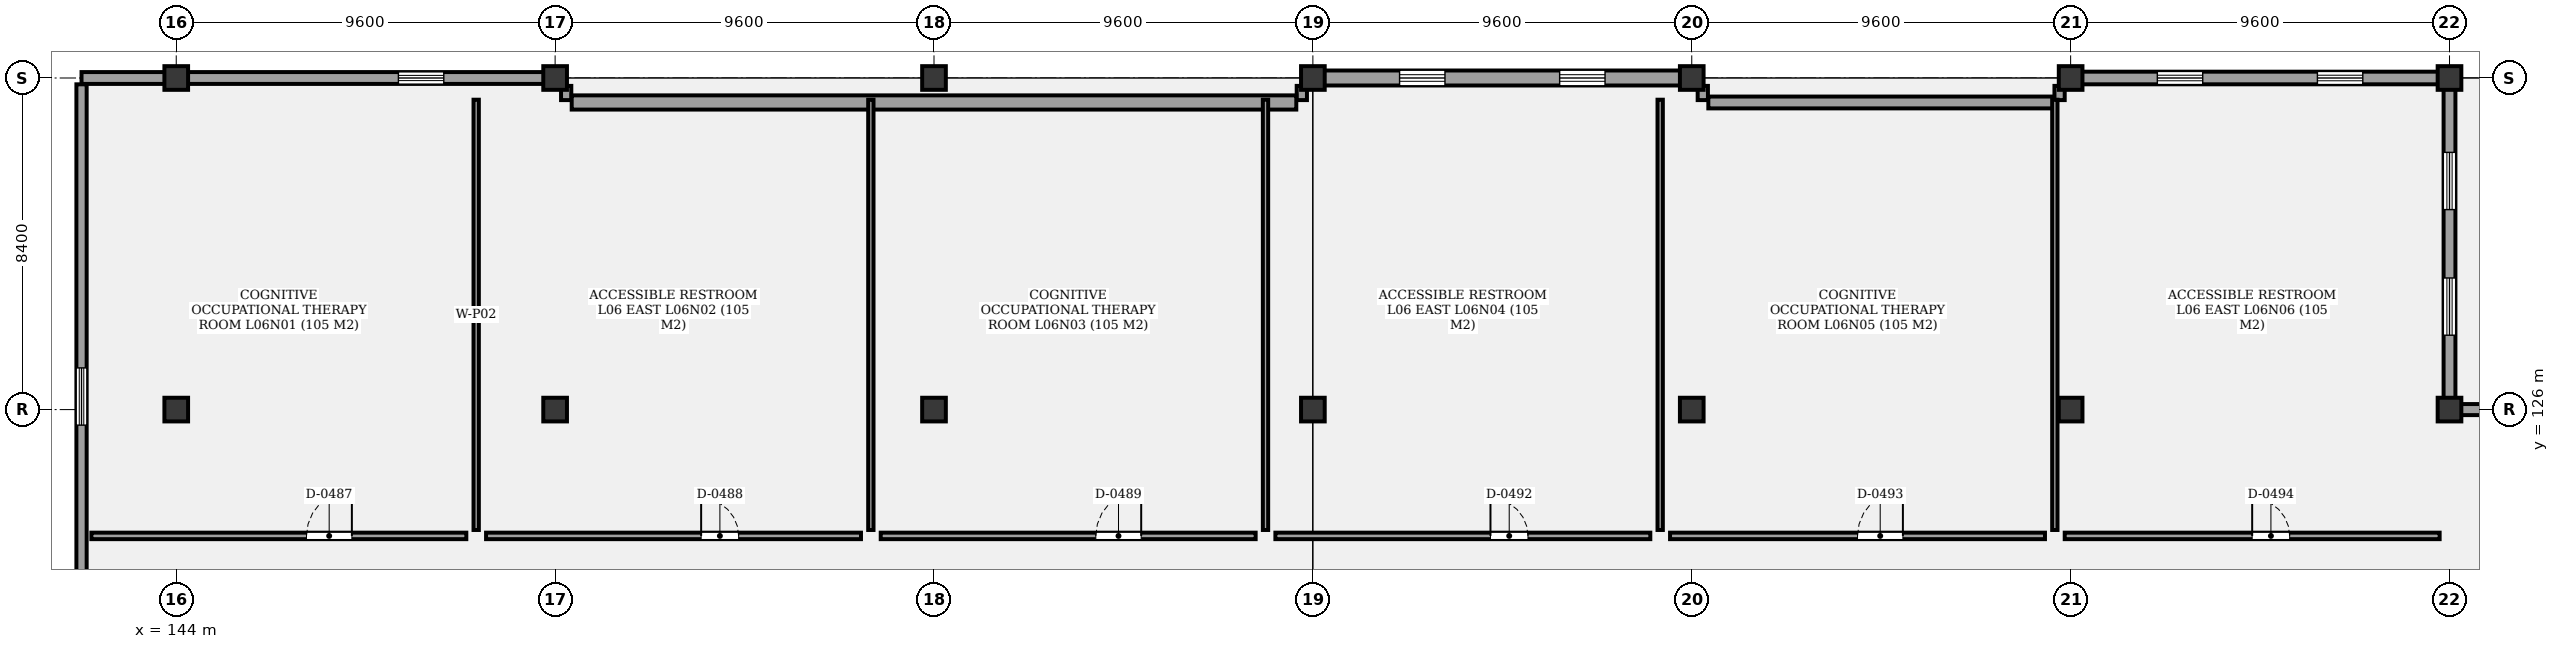
"""IFC4 building model, lengths in metres.
Left out: names, types, materials, properties, quantities, classifications, styles, units other than length and angle.
Written with IfcOpenShell. Run it as: python <this file> out.ifc"""

import sys

from ifc_helpers import new_model, si_unit, direction, frame, frame_2d, origin, origin_2d, place, context, subcontext, project, spatial, rectangle, extrude, element, fill, save


model = new_model("IFC4")
c1 = context("Model", 3, precision=1e-05, world=origin(), true_north=direction((0.0, 1.0)))
c2 = subcontext(c1, "Body", "Model", "MODEL_VIEW")
j1 = project(units=[si_unit("LENGTHUNIT", "METRE"), si_unit("PLANEANGLEUNIT", "RADIAN")], contexts=[c1])
p1 = place(None, origin())
s1 = spatial("IfcSite", under=j1, at=p1, CompositionType="ELEMENT")
p2 = place(p1, origin())
s2 = spatial("IfcBuilding", under=s1, at=p2, CompositionType="ELEMENT")
p3 = place(p2, frame((0.0, 0.0, 26.2)))
s3 = spatial("IfcBuildingStorey", under=s2, at=p3, CompositionType="ELEMENT", Elevation=26.2)
for number, where, z_axis, x_axis in (
    (1, (144.0, 126.0, 0.0), (0.0, 0.0, 1.0), (1.0, 0.0, 0.0)),
    (2, (144.0, 134.4, 0.0), (0.0, 0.0, 1.0), (1.0, 0.0, 0.0)),
    (3, (153.6, 126.0, 0.0), (0.0, 0.0, 1.0), (1.0, 0.0, 0.0)),
    (4, (153.6, 134.4, 0.0), (0.0, 0.0, 1.0), (1.0, 0.0, 0.0)),
    (5, (163.2, 126.0, 0.0), (0.0, 0.0, 1.0), (1.0, 0.0, 0.0)),
    (6, (163.2, 134.4, 0.0), (0.0, 0.0, 1.0), (1.0, 0.0, 0.0)),
    (7, (172.8, 126.0, 0.0), (0.0, 0.0, 1.0), (1.0, 0.0, 0.0)),
    (8, (172.8, 134.4, 0.0), (0.0, 0.0, 1.0), (1.0, 0.0, 0.0)),
    (9, (182.4, 126.0, 0.0), (0.0, 0.0, 1.0), (1.0, 0.0, 0.0)),
    (10, (182.4, 134.4, 0.0), (0.0, 0.0, 1.0), (1.0, 0.0, 0.0)),
    (11, (192.0, 126.0, 0.0), (0.0, 0.0, 1.0), (1.0, 0.0, 0.0)),
    (12, (192.0, 134.4, 0.0), (0.0, 0.0, 1.0), (1.0, 0.0, 0.0)),
    (13, (201.6, 126.0, 0.0), (0.0, 0.0, 1.0), (1.0, 0.0, 0.0)),
    (14, (201.6, 134.4, 0.0), (0.0, 0.0, 1.0), (1.0, 0.0, 0.0)),
):
    element("IfcColumn", number, at=place(p3, frame(where, z_axis=z_axis, x_axis=x_axis)), inside=s3, PredefinedType="COLUMN", context=c2, shape_type="SweptSolid", body=[
        extrude(rectangle(XDim=0.6, YDim=0.6, at=origin_2d()), origin(), (0.0, 0.0, 1.0), 4.2),
    ])
p4 = place(p3, frame((201.6, 126.0, 0.0), z_axis=(0.0, 0.0, 1.0), x_axis=(1.0, 0.0, 0.0)))
e15 = element("IfcWall", 15, at=p4, inside=s3, PredefinedType="SOLIDWALL", context=c2, shape_type="SweptSolid", body=[
    extrude(rectangle(XDim=9.6, YDim=0.28, at=frame_2d((4.8, 0.0))), origin(), (0.0, 0.0, 1.0), 3.39),
])
p5 = place(p4, frame((2.158, 0.0, 0.85)))
e16 = element("IfcOpeningElement", 16, at=p5, cuts=e15, PredefinedType="OPENING", context=c2, shape_type="SweptSolid", body=[
    extrude(rectangle(XDim=1.3, YDim=1.6, at=frame_2d((0.65, 0.8))), frame((0.0, 0.15, 0.0), z_axis=(0.0, -1.0, 0.0), x_axis=(1.0, 0.0, 0.0)), (0.0, 0.0, 1.0), 0.3),
])
p6 = place(p4, frame((6.142, 0.0, 0.85)))
e17 = element("IfcOpeningElement", 17, at=p6, cuts=e15, PredefinedType="OPENING", context=c2, shape_type="SweptSolid", body=[
    extrude(rectangle(XDim=1.3, YDim=1.6, at=frame_2d((0.65, 0.8))), frame((0.0, 0.15, 0.0), z_axis=(0.0, -1.0, 0.0), x_axis=(1.0, 0.0, 0.0)), (0.0, 0.0, 1.0), 0.3),
])
p7 = place(p3, frame((141.6, 134.4, 0.0), z_axis=(0.0, 0.0, 1.0), x_axis=(1.0, 0.0, 0.0)))
e18 = element("IfcWall", 18, at=p7, inside=s3, PredefinedType="SOLIDWALL", context=c2, shape_type="SweptSolid", body=[
    extrude(rectangle(XDim=12.0, YDim=0.3, at=frame_2d((6.0, 0.0))), origin(), (0.0, 0.0, 1.0), 3.39),
])
p8 = place(p7, frame((8.029, 0.0, 0.85)))
e19 = element("IfcOpeningElement", 19, at=p8, cuts=e18, PredefinedType="OPENING", context=c2, shape_type="SweptSolid", body=[
    extrude(rectangle(XDim=1.15, YDim=1.6, at=frame_2d((0.575, 0.8))), frame((0.0, 0.16, 0.0), z_axis=(0.0, -1.0, 0.0), x_axis=(1.0, 0.0, 0.0)), (0.0, 0.0, 1.0), 0.32),
])
for number, where, z_axis, x_axis in (
    (20, (153.88, 134.2, 0.0), (0.0, 0.0, 1.0), (0.0, -1.0, 0.0)),
    (21, (172.52, 134.2, 0.0), (0.0, 0.0, 1.0), (0.0, -1.0, 0.0)),
):
    element("IfcWall", number, at=place(p3, frame(where, z_axis=z_axis, x_axis=x_axis)), inside=s3, PredefinedType="SOLIDWALL", context=c2, shape_type="SweptSolid", body=[
        extrude(rectangle(XDim=0.36, YDim=0.26, at=frame_2d((0.18, 0.0))), origin(), (0.0, 0.0, 1.0), 3.39),
    ])
p9 = place(p3, frame((154.02, 133.78, 0.0), z_axis=(0.0, 0.0, 1.0), x_axis=(1.0, 0.0, 0.0)))
e22 = element("IfcWall", 22, at=p9, inside=s3, PredefinedType="SOLIDWALL", context=c2, shape_type="SweptSolid", body=[
    extrude(rectangle(XDim=18.36, YDim=0.36, at=frame_2d((9.18, 0.0))), origin(), (0.0, 0.0, 1.0), 3.39),
])
p10 = place(p3, frame((172.8, 134.4, 0.0), z_axis=(0.0, 0.0, 1.0), x_axis=(1.0, 0.0, 0.0)))
e23 = element("IfcWall", 23, at=p10, inside=s3, PredefinedType="SOLIDWALL", context=c2, shape_type="SweptSolid", body=[
    extrude(rectangle(XDim=9.6, YDim=0.38, at=frame_2d((4.8, 0.0))), origin(), (0.0, 0.0, 1.0), 3.39),
])
p11 = place(p10, frame((2.197, 0.0, 0.85)))
e24 = element("IfcOpeningElement", 24, at=p11, cuts=e23, PredefinedType="OPENING", context=c2, shape_type="SweptSolid", body=[
    extrude(rectangle(XDim=1.15, YDim=1.6, at=frame_2d((0.575, 0.8))), frame((0.0, 0.2, 0.0), z_axis=(0.0, -1.0, 0.0), x_axis=(1.0, 0.0, 0.0)), (0.0, 0.0, 1.0), 0.4),
])
p12 = place(p10, frame((6.253, 0.0, 0.85)))
e25 = element("IfcOpeningElement", 25, at=p12, cuts=e23, PredefinedType="OPENING", context=c2, shape_type="SweptSolid", body=[
    extrude(rectangle(XDim=1.15, YDim=1.6, at=frame_2d((0.575, 0.8))), frame((0.0, 0.2, 0.0), z_axis=(0.0, -1.0, 0.0), x_axis=(1.0, 0.0, 0.0)), (0.0, 0.0, 1.0), 0.4),
])
for number, where, z_axis, x_axis in (
    (26, (182.68, 134.2, 0.0), (0.0, 0.0, 1.0), (0.0, -1.0, 0.0)),
    (27, (191.72, 134.2, 0.0), (0.0, 0.0, 1.0), (0.0, -1.0, 0.0)),
):
    element("IfcWall", number, at=place(p3, frame(where, z_axis=z_axis, x_axis=x_axis)), inside=s3, PredefinedType="SOLIDWALL", context=c2, shape_type="SweptSolid", body=[
        extrude(rectangle(XDim=0.36, YDim=0.26, at=frame_2d((0.18, 0.0))), origin(), (0.0, 0.0, 1.0), 3.39),
    ])
p13 = place(p3, frame((182.82, 133.78, 0.0), z_axis=(0.0, 0.0, 1.0), x_axis=(1.0, 0.0, 0.0)))
e28 = element("IfcWall", 28, at=p13, inside=s3, PredefinedType="SOLIDWALL", context=c2, shape_type="SweptSolid", body=[
    extrude(rectangle(XDim=8.76, YDim=0.3, at=frame_2d((4.38, 0.0))), origin(), (0.0, 0.0, 1.0), 3.39),
])
p14 = place(p3, frame((192.0, 134.4, 0.0), z_axis=(0.0, 0.0, 1.0), x_axis=(1.0, 0.0, 0.0)))
e29 = element("IfcWall", 29, at=p14, inside=s3, PredefinedType="SOLIDWALL", context=c2, shape_type="SweptSolid", body=[
    extrude(rectangle(XDim=9.6, YDim=0.32, at=frame_2d((4.8, 0.0))), origin(), (0.0, 0.0, 1.0), 3.39),
])
p15 = place(p14, frame((2.197, 0.0, 0.85)))
e30 = element("IfcOpeningElement", 30, at=p15, cuts=e29, PredefinedType="OPENING", context=c2, shape_type="SweptSolid", body=[
    extrude(rectangle(XDim=1.15, YDim=1.6, at=frame_2d((0.575, 0.8))), frame((0.0, 0.17, 0.0), z_axis=(0.0, -1.0, 0.0), x_axis=(1.0, 0.0, 0.0)), (0.0, 0.0, 1.0), 0.34),
])
p16 = place(p14, frame((6.253, 0.0, 0.85)))
e31 = element("IfcOpeningElement", 31, at=p16, cuts=e29, PredefinedType="OPENING", context=c2, shape_type="SweptSolid", body=[
    extrude(rectangle(XDim=1.15, YDim=1.6, at=frame_2d((0.575, 0.8))), frame((0.0, 0.17, 0.0), z_axis=(0.0, -1.0, 0.0), x_axis=(1.0, 0.0, 0.0)), (0.0, 0.0, 1.0), 0.34),
])
p17 = place(p3, frame((141.6, 105.16, 0.0), z_axis=(0.0, 0.0, 1.0), x_axis=(0.0, 1.0, 0.0)))
e32 = element("IfcWall", 32, at=p17, inside=s3, PredefinedType="SOLIDWALL", context=c2, shape_type="SweptSolid", body=[
    extrude(rectangle(XDim=29.08, YDim=0.26, at=frame_2d((14.54, 0.0))), origin(), (0.0, 0.0, 1.0), 3.39),
])
p18 = place(p17, frame((7.184, 0.0, 0.85)))
e33 = element("IfcOpeningElement", 33, at=p18, cuts=e32, PredefinedType="OPENING", context=c2, shape_type="SweptSolid", body=[
    extrude(rectangle(XDim=1.45, YDim=1.6, at=frame_2d((0.725, 0.8))), frame((0.0, 0.14, 0.0), z_axis=(0.0, -1.0, 0.0), x_axis=(1.0, 0.0, 0.0)), (0.0, 0.0, 1.0), 0.28),
])
p19 = place(p17, frame((20.446, 0.0, 0.85)))
e34 = element("IfcOpeningElement", 34, at=p19, cuts=e32, PredefinedType="OPENING", context=c2, shape_type="SweptSolid", body=[
    extrude(rectangle(XDim=1.45, YDim=1.6, at=frame_2d((0.725, 0.8))), frame((0.0, 0.14, 0.0), z_axis=(0.0, -1.0, 0.0), x_axis=(1.0, 0.0, 0.0)), (0.0, 0.0, 1.0), 0.28),
])
p20 = place(p3, frame((201.6, 134.24, 0.0), z_axis=(0.0, 0.0, 1.0), x_axis=(0.0, -1.0, 0.0)))
e35 = element("IfcWall", 35, at=p20, inside=s3, PredefinedType="SOLIDWALL", context=c2, shape_type="SweptSolid", body=[
    extrude(rectangle(XDim=8.08, YDim=0.3, at=frame_2d((4.04, 0.0))), origin(), (0.0, 0.0, 1.0), 3.39),
])
p21 = place(p20, frame((1.724, 0.0, 0.85)))
e36 = element("IfcOpeningElement", 36, at=p21, cuts=e35, PredefinedType="OPENING", context=c2, shape_type="SweptSolid", body=[
    extrude(rectangle(XDim=1.45, YDim=1.6, at=frame_2d((0.725, 0.8))), frame((0.0, 0.16, 0.0), z_axis=(0.0, -1.0, 0.0), x_axis=(1.0, 0.0, 0.0)), (0.0, 0.0, 1.0), 0.32),
])
p22 = place(p20, frame((4.906, 0.0, 0.85)))
e37 = element("IfcOpeningElement", 37, at=p22, cuts=e35, PredefinedType="OPENING", context=c2, shape_type="SweptSolid", body=[
    extrude(rectangle(XDim=1.45, YDim=1.6, at=frame_2d((0.725, 0.8))), frame((0.0, 0.16, 0.0), z_axis=(0.0, -1.0, 0.0), x_axis=(1.0, 0.0, 0.0)), (0.0, 0.0, 1.0), 0.32),
])
p23 = place(p3, frame((141.85, 122.8, 0.0), z_axis=(0.0, 0.0, 1.0), x_axis=(1.0, 0.0, 0.0)))
e38 = element("IfcWall", 38, at=p23, inside=s3, PredefinedType="PARTITIONING", context=c2, shape_type="SweptSolid", body=[
    extrude(rectangle(XDim=9.5, YDim=0.165, at=frame_2d((4.75, 0.0))), origin(), (0.0, 0.0, 1.0), 3.3),
])
p24 = place(p23, frame((5.45, 0.0, 0.0)))
e39 = element("IfcOpeningElement", 39, at=p24, cuts=e38, PredefinedType="OPENING", context=c2, shape_type="SweptSolid", body=[
    extrude(rectangle(XDim=1.15, YDim=2.2, at=frame_2d((0.575, 1.1))), frame((0.0, 0.093, 0.0), z_axis=(0.0, -1.0, 0.0), x_axis=(1.0, 0.0, 0.0)), (0.0, 0.0, 1.0), 0.185),
])
p25 = place(p3, frame((151.85, 122.8, 0.0), z_axis=(0.0, 0.0, 1.0), x_axis=(1.0, 0.0, 0.0)))
e40 = element("IfcWall", 40, at=p25, inside=s3, PredefinedType="PARTITIONING", context=c2, shape_type="SweptSolid", body=[
    extrude(rectangle(XDim=9.5, YDim=0.165, at=frame_2d((4.75, 0.0))), origin(), (0.0, 0.0, 1.0), 3.3),
])
p26 = place(p25, frame((5.45, 0.0, 0.0)))
e41 = element("IfcOpeningElement", 41, at=p26, cuts=e40, PredefinedType="OPENING", context=c2, shape_type="SweptSolid", body=[
    extrude(rectangle(XDim=0.95, YDim=2.1, at=frame_2d((0.475, 1.05))), frame((0.0, 0.093, 0.0), z_axis=(0.0, -1.0, 0.0), x_axis=(1.0, 0.0, 0.0)), (0.0, 0.0, 1.0), 0.185),
])
p27 = place(p3, frame((151.6, 122.95, 0.0), z_axis=(0.0, 0.0, 1.0), x_axis=(0.0, 1.0, 0.0)))
e42 = element("IfcWall", 42, at=p27, inside=s3, PredefinedType="PARTITIONING", context=c2, shape_type="SweptSolid", body=[
    extrude(rectangle(XDim=10.9, YDim=0.135, at=frame_2d((5.45, 0.0))), origin(), (0.0, 0.0, 1.0), 3.3),
])
p28 = place(p3, frame((161.85, 122.8, 0.0), z_axis=(0.0, 0.0, 1.0), x_axis=(1.0, 0.0, 0.0)))
e43 = element("IfcWall", 43, at=p28, inside=s3, PredefinedType="PARTITIONING", context=c2, shape_type="SweptSolid", body=[
    extrude(rectangle(XDim=9.5, YDim=0.165, at=frame_2d((4.75, 0.0))), origin(), (0.0, 0.0, 1.0), 3.3),
])
p29 = place(p28, frame((5.45, 0.0, 0.0)))
e44 = element("IfcOpeningElement", 44, at=p29, cuts=e43, PredefinedType="OPENING", context=c2, shape_type="SweptSolid", body=[
    extrude(rectangle(XDim=1.15, YDim=2.2, at=frame_2d((0.575, 1.1))), frame((0.0, 0.093, 0.0), z_axis=(0.0, -1.0, 0.0), x_axis=(1.0, 0.0, 0.0)), (0.0, 0.0, 1.0), 0.185),
])
p30 = place(p3, frame((161.6, 122.95, 0.0), z_axis=(0.0, 0.0, 1.0), x_axis=(0.0, 1.0, 0.0)))
e45 = element("IfcWall", 45, at=p30, inside=s3, PredefinedType="PARTITIONING", context=c2, shape_type="SweptSolid", body=[
    extrude(rectangle(XDim=10.9, YDim=0.135, at=frame_2d((5.45, 0.0))), origin(), (0.0, 0.0, 1.0), 3.3),
])
p31 = place(p3, frame((171.85, 122.8, 0.0), z_axis=(0.0, 0.0, 1.0), x_axis=(1.0, 0.0, 0.0)))
e46 = element("IfcWall", 46, at=p31, inside=s3, PredefinedType="PARTITIONING", context=c2, shape_type="SweptSolid", body=[
    extrude(rectangle(XDim=9.5, YDim=0.165, at=frame_2d((4.75, 0.0))), origin(), (0.0, 0.0, 1.0), 3.3),
])
p32 = place(p31, frame((5.45, 0.0, 0.0)))
e47 = element("IfcOpeningElement", 47, at=p32, cuts=e46, PredefinedType="OPENING", context=c2, shape_type="SweptSolid", body=[
    extrude(rectangle(XDim=0.95, YDim=2.1, at=frame_2d((0.475, 1.05))), frame((0.0, 0.093, 0.0), z_axis=(0.0, -1.0, 0.0), x_axis=(1.0, 0.0, 0.0)), (0.0, 0.0, 1.0), 0.185),
])
p33 = place(p3, frame((171.6, 122.95, 0.0), z_axis=(0.0, 0.0, 1.0), x_axis=(0.0, 1.0, 0.0)))
e48 = element("IfcWall", 48, at=p33, inside=s3, PredefinedType="PARTITIONING", context=c2, shape_type="SweptSolid", body=[
    extrude(rectangle(XDim=10.9, YDim=0.135, at=frame_2d((5.45, 0.0))), origin(), (0.0, 0.0, 1.0), 3.3),
])
p34 = place(p3, frame((181.85, 122.8, 0.0), z_axis=(0.0, 0.0, 1.0), x_axis=(1.0, 0.0, 0.0)))
e49 = element("IfcWall", 49, at=p34, inside=s3, PredefinedType="PARTITIONING", context=c2, shape_type="SweptSolid", body=[
    extrude(rectangle(XDim=9.5, YDim=0.165, at=frame_2d((4.75, 0.0))), origin(), (0.0, 0.0, 1.0), 3.3),
])
p35 = place(p34, frame((4.75, 0.0, 0.0)))
e50 = element("IfcOpeningElement", 50, at=p35, cuts=e49, PredefinedType="OPENING", context=c2, shape_type="SweptSolid", body=[
    extrude(rectangle(XDim=1.15, YDim=2.2, at=frame_2d((0.575, 1.1))), frame((0.0, 0.093, 0.0), z_axis=(0.0, -1.0, 0.0), x_axis=(1.0, 0.0, 0.0)), (0.0, 0.0, 1.0), 0.185),
])
p36 = place(p3, frame((181.6, 122.95, 0.0), z_axis=(0.0, 0.0, 1.0), x_axis=(0.0, 1.0, 0.0)))
e51 = element("IfcWall", 51, at=p36, inside=s3, PredefinedType="PARTITIONING", context=c2, shape_type="SweptSolid", body=[
    extrude(rectangle(XDim=10.9, YDim=0.135, at=frame_2d((5.45, 0.0))), origin(), (0.0, 0.0, 1.0), 3.3),
])
p37 = place(p3, frame((191.85, 122.8, 0.0), z_axis=(0.0, 0.0, 1.0), x_axis=(1.0, 0.0, 0.0)))
e52 = element("IfcWall", 52, at=p37, inside=s3, PredefinedType="PARTITIONING", context=c2, shape_type="SweptSolid", body=[
    extrude(rectangle(XDim=9.5, YDim=0.165, at=frame_2d((4.75, 0.0))), origin(), (0.0, 0.0, 1.0), 3.3),
])
p38 = place(p37, frame((4.75, 0.0, 0.0)))
e53 = element("IfcOpeningElement", 53, at=p38, cuts=e52, PredefinedType="OPENING", context=c2, shape_type="SweptSolid", body=[
    extrude(rectangle(XDim=0.95, YDim=2.1, at=frame_2d((0.475, 1.05))), frame((0.0, 0.093, 0.0), z_axis=(0.0, -1.0, 0.0), x_axis=(1.0, 0.0, 0.0)), (0.0, 0.0, 1.0), 0.185),
])
p39 = place(p3, frame((191.6, 122.95, 0.0), z_axis=(0.0, 0.0, 1.0), x_axis=(0.0, 1.0, 0.0)))
e54 = element("IfcWall", 54, at=p39, inside=s3, PredefinedType="PARTITIONING", context=c2, shape_type="SweptSolid", body=[
    extrude(rectangle(XDim=10.9, YDim=0.135, at=frame_2d((5.45, 0.0))), origin(), (0.0, 0.0, 1.0), 3.3),
])
p40 = place(p8, origin())
e55 = element("IfcWindow", 55, at=p40, inside=s3, PartitioningType="SINGLE_PANEL", PredefinedType="WINDOW", context=c2, shape_type="SweptSolid", body=[
    extrude(rectangle(XDim=1.15, YDim=1.6, at=frame_2d((0.575, 0.8))), frame((0.0, 0.03, 0.0), z_axis=(0.0, -1.0, 0.0), x_axis=(1.0, 0.0, 0.0)), (0.0, 0.0, 1.0), 0.06),
])
fill(e19, e55)
p41 = place(p11, origin())
e56 = element("IfcWindow", 56, at=p41, inside=s3, PartitioningType="SINGLE_PANEL", PredefinedType="WINDOW", context=c2, shape_type="SweptSolid", body=[
    extrude(rectangle(XDim=1.15, YDim=1.6, at=frame_2d((0.575, 0.8))), frame((0.0, 0.03, 0.0), z_axis=(0.0, -1.0, 0.0), x_axis=(1.0, 0.0, 0.0)), (0.0, 0.0, 1.0), 0.06),
])
fill(e24, e56)
p42 = place(p12, origin())
e57 = element("IfcWindow", 57, at=p42, inside=s3, PartitioningType="SINGLE_PANEL", PredefinedType="WINDOW", context=c2, shape_type="SweptSolid", body=[
    extrude(rectangle(XDim=1.15, YDim=1.6, at=frame_2d((0.575, 0.8))), frame((0.0, 0.03, 0.0), z_axis=(0.0, -1.0, 0.0), x_axis=(1.0, 0.0, 0.0)), (0.0, 0.0, 1.0), 0.06),
])
fill(e25, e57)
p43 = place(p15, origin())
e58 = element("IfcWindow", 58, at=p43, inside=s3, PartitioningType="SINGLE_PANEL", PredefinedType="WINDOW", context=c2, shape_type="SweptSolid", body=[
    extrude(rectangle(XDim=1.15, YDim=1.6, at=frame_2d((0.575, 0.8))), frame((0.0, 0.03, 0.0), z_axis=(0.0, -1.0, 0.0), x_axis=(1.0, 0.0, 0.0)), (0.0, 0.0, 1.0), 0.06),
])
fill(e30, e58)
p44 = place(p16, origin())
e59 = element("IfcWindow", 59, at=p44, inside=s3, PartitioningType="SINGLE_PANEL", PredefinedType="WINDOW", context=c2, shape_type="SweptSolid", body=[
    extrude(rectangle(XDim=1.15, YDim=1.6, at=frame_2d((0.575, 0.8))), frame((0.0, 0.03, 0.0), z_axis=(0.0, -1.0, 0.0), x_axis=(1.0, 0.0, 0.0)), (0.0, 0.0, 1.0), 0.06),
])
fill(e31, e59)
p45 = place(p19, origin())
e60 = element("IfcWindow", 60, at=p45, inside=s3, PartitioningType="SINGLE_PANEL", PredefinedType="WINDOW", context=c2, shape_type="SweptSolid", body=[
    extrude(rectangle(XDim=1.45, YDim=1.6, at=frame_2d((0.725, 0.8))), frame((0.0, 0.03, 0.0), z_axis=(0.0, -1.0, 0.0), x_axis=(1.0, 0.0, 0.0)), (0.0, 0.0, 1.0), 0.06),
])
fill(e34, e60)
p46 = place(p21, origin())
e61 = element("IfcWindow", 61, at=p46, inside=s3, PartitioningType="SINGLE_PANEL", PredefinedType="WINDOW", context=c2, shape_type="SweptSolid", body=[
    extrude(rectangle(XDim=1.45, YDim=1.6, at=frame_2d((0.725, 0.8))), frame((0.0, 0.03, 0.0), z_axis=(0.0, -1.0, 0.0), x_axis=(1.0, 0.0, 0.0)), (0.0, 0.0, 1.0), 0.06),
])
fill(e36, e61)
p47 = place(p22, origin())
e62 = element("IfcWindow", 62, at=p47, inside=s3, PartitioningType="SINGLE_PANEL", PredefinedType="WINDOW", context=c2, shape_type="SweptSolid", body=[
    extrude(rectangle(XDim=1.45, YDim=1.6, at=frame_2d((0.725, 0.8))), frame((0.0, 0.03, 0.0), z_axis=(0.0, -1.0, 0.0), x_axis=(1.0, 0.0, 0.0)), (0.0, 0.0, 1.0), 0.06),
])
fill(e37, e62)
p48 = place(p24, origin())
e63 = element("IfcDoor", 63, at=p48, inside=s3, OperationType="SINGLE_SWING_RIGHT", PredefinedType="DOOR", context=c2, shape_type="SweptSolid", body=[
    extrude(rectangle(XDim=1.15, YDim=2.2, at=frame_2d((0.575, 1.1))), frame((0.0, 0.025, 0.0), z_axis=(0.0, -1.0, 0.0), x_axis=(1.0, 0.0, 0.0)), (0.0, 0.0, 1.0), 0.05),
])
fill(e39, e63)
p49 = place(p26, origin())
e64 = element("IfcDoor", 64, at=p49, inside=s3, OperationType="SINGLE_SWING_LEFT", PredefinedType="DOOR", context=c2, shape_type="SweptSolid", body=[
    extrude(rectangle(XDim=0.95, YDim=2.1, at=frame_2d((0.475, 1.05))), frame((0.0, 0.025, 0.0), z_axis=(0.0, -1.0, 0.0), x_axis=(1.0, 0.0, 0.0)), (0.0, 0.0, 1.0), 0.05),
])
fill(e41, e64)
p50 = place(p29, origin())
e65 = element("IfcDoor", 65, at=p50, inside=s3, OperationType="SINGLE_SWING_RIGHT", PredefinedType="DOOR", context=c2, shape_type="SweptSolid", body=[
    extrude(rectangle(XDim=1.15, YDim=2.2, at=frame_2d((0.575, 1.1))), frame((0.0, 0.025, 0.0), z_axis=(0.0, -1.0, 0.0), x_axis=(1.0, 0.0, 0.0)), (0.0, 0.0, 1.0), 0.05),
])
fill(e44, e65)
p51 = place(p32, origin())
e66 = element("IfcDoor", 66, at=p51, inside=s3, OperationType="SINGLE_SWING_LEFT", PredefinedType="DOOR", context=c2, shape_type="SweptSolid", body=[
    extrude(rectangle(XDim=0.95, YDim=2.1, at=frame_2d((0.475, 1.05))), frame((0.0, 0.025, 0.0), z_axis=(0.0, -1.0, 0.0), x_axis=(1.0, 0.0, 0.0)), (0.0, 0.0, 1.0), 0.05),
])
fill(e47, e66)
p52 = place(p35, origin())
e67 = element("IfcDoor", 67, at=p52, inside=s3, OperationType="SINGLE_SWING_RIGHT", PredefinedType="DOOR", context=c2, shape_type="SweptSolid", body=[
    extrude(rectangle(XDim=1.15, YDim=2.2, at=frame_2d((0.575, 1.1))), frame((0.0, 0.025, 0.0), z_axis=(0.0, -1.0, 0.0), x_axis=(1.0, 0.0, 0.0)), (0.0, 0.0, 1.0), 0.05),
])
fill(e50, e67)
p53 = place(p38, origin())
e68 = element("IfcDoor", 68, at=p53, inside=s3, OperationType="SINGLE_SWING_LEFT", PredefinedType="DOOR", context=c2, shape_type="SweptSolid", body=[
    extrude(rectangle(XDim=0.95, YDim=2.1, at=frame_2d((0.475, 1.05))), frame((0.0, 0.025, 0.0), z_axis=(0.0, -1.0, 0.0), x_axis=(1.0, 0.0, 0.0)), (0.0, 0.0, 1.0), 0.05),
])
fill(e53, e68)
save(model, sys.argv[1])
